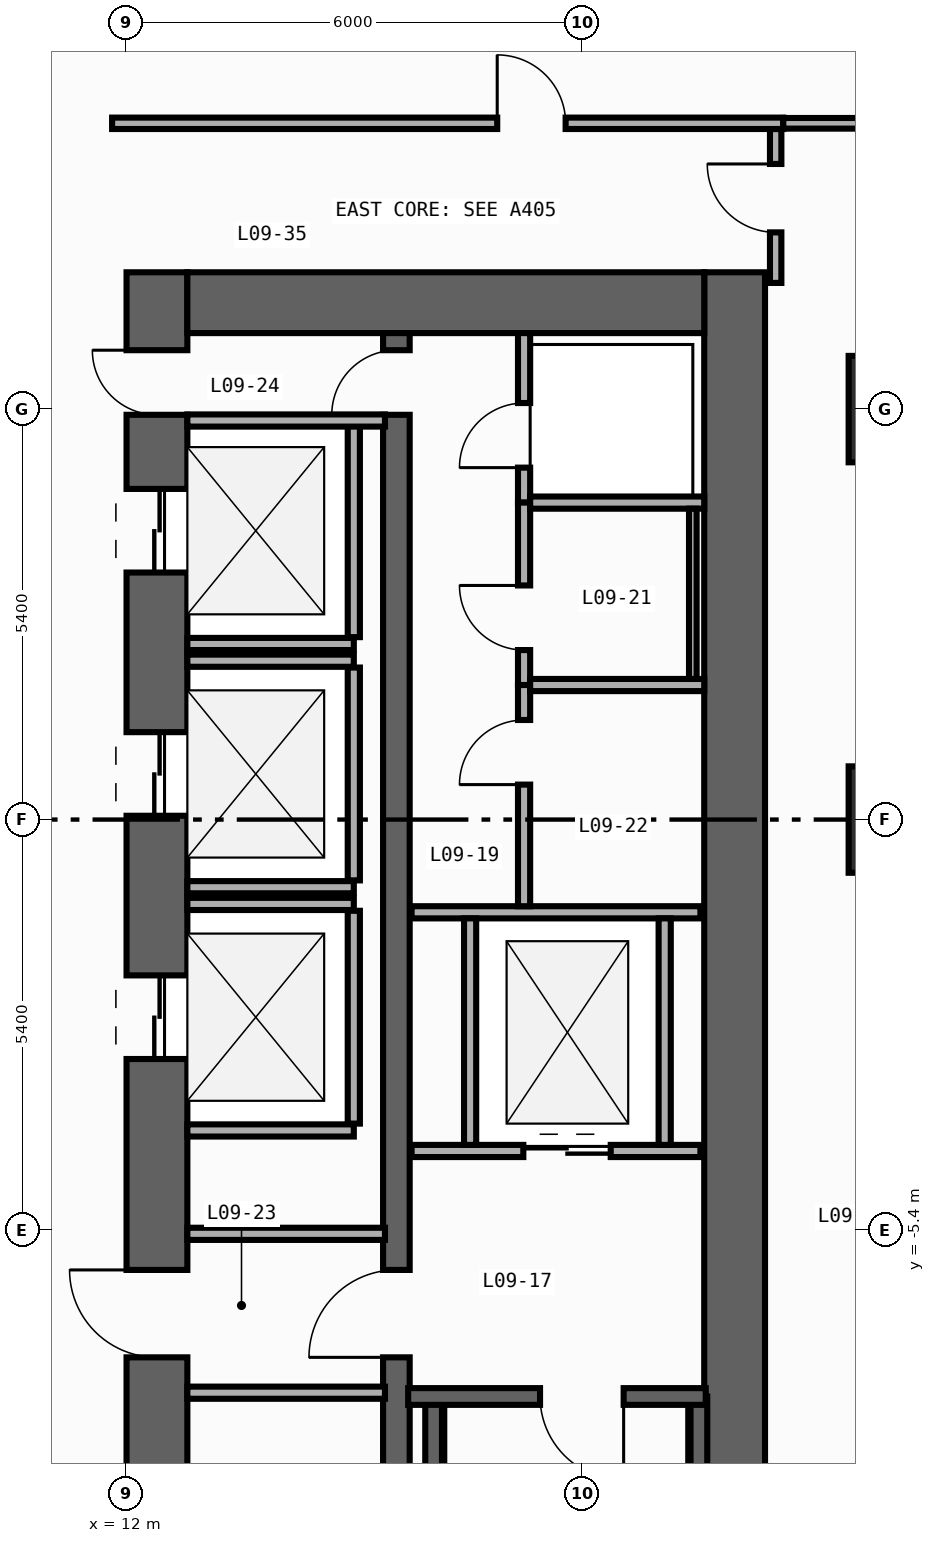
"""IFC4 building model, lengths in metres.
Left out: names, types, materials, properties, quantities, classifications, styles, units other than length and angle.
Written with IfcOpenShell. Run it as: python <this file> out.ifc"""

import sys

from ifc_helpers import new_model, si_unit, direction, frame, frame_2d, origin, origin_2d, place, context, subcontext, project, spatial, rectangle, extrude, element, fill, save


model = new_model("IFC4")
c1 = context("Model", 3, precision=1e-05, world=origin(), true_north=direction((0.0, 1.0)))
c2 = subcontext(c1, "Body", "Model", "MODEL_VIEW")
j1 = project(units=[si_unit("LENGTHUNIT", "METRE"), si_unit("PLANEANGLEUNIT", "RADIAN")], contexts=[c1])
p1 = place(None, origin())
s1 = spatial("IfcSite", under=j1, at=p1, CompositionType="ELEMENT")
p2 = place(p1, origin())
s2 = spatial("IfcBuilding", under=s1, at=p2, CompositionType="ELEMENT")
p3 = place(p2, frame((0.0, 0.0, 38.6)))
s3 = spatial("IfcBuildingStorey", under=s2, at=p3, CompositionType="ELEMENT", Elevation=38.6)
p4 = place(p3, frame((12.4, -19.8, 0.0), z_axis=(0.0, 0.0, 1.0), x_axis=(0.0, 1.0, 0.0)))
e1 = element("IfcWall", 1, at=p4, inside=s3, PredefinedType="SHEAR", context=c2, shape_type="SweptSolid", body=[
    extrude(rectangle(XDim=27.0, YDim=0.8, at=frame_2d((13.5, 0.0))), origin(), (0.0, 0.0, 1.0), 3.94),
])
p5 = place(p4, frame((23.05, 0.0, 0.0)))
e2 = element("IfcOpeningElement", 2, at=p5, cuts=e1, PredefinedType="OPENING", context=c2, shape_type="SweptSolid", body=[
    extrude(rectangle(XDim=1.1, YDim=2.2, at=frame_2d((0.55, 1.1))), frame((0.0, 0.41, 0.0), z_axis=(0.0, -1.0, 0.0), x_axis=(1.0, 0.0, 0.0)), (0.0, 0.0, 1.0), 0.82),
])
p6 = place(p4, frame((19.85, 0.0, 0.0)))
e3 = element("IfcOpeningElement", 3, at=p6, cuts=e1, PredefinedType="OPENING", context=c2, shape_type="SweptSolid", body=[
    extrude(rectangle(XDim=1.1, YDim=2.2, at=frame_2d((0.55, 1.1))), frame((0.0, 0.41, 0.0), z_axis=(0.0, -1.0, 0.0), x_axis=(1.0, 0.0, 0.0)), (0.0, 0.0, 1.0), 0.82),
])
p7 = place(p4, frame((16.65, 0.0, 0.0)))
e4 = element("IfcOpeningElement", 4, at=p7, cuts=e1, PredefinedType="OPENING", context=c2, shape_type="SweptSolid", body=[
    extrude(rectangle(XDim=1.1, YDim=2.2, at=frame_2d((0.55, 1.1))), frame((0.0, 0.41, 0.0), z_axis=(0.0, -1.0, 0.0), x_axis=(1.0, 0.0, 0.0)), (0.0, 0.0, 1.0), 0.82),
])
p8 = place(p4, frame((10.175, 0.0, 0.0)))
e5 = element("IfcOpeningElement", 5, at=p8, cuts=e1, PredefinedType="OPENING", context=c2, shape_type="SweptSolid", body=[
    extrude(rectangle(XDim=0.85, YDim=2.1, at=frame_2d((0.425, 1.05))), frame((0.0, 0.41, 0.0), z_axis=(0.0, -1.0, 0.0), x_axis=(1.0, 0.0, 0.0)), (0.0, 0.0, 1.0), 0.82),
])
p9 = place(p4, frame((12.725, 0.0, 0.0)))
e6 = element("IfcOpeningElement", 6, at=p9, cuts=e1, PredefinedType="OPENING", context=c2, shape_type="SweptSolid", body=[
    extrude(rectangle(XDim=1.15, YDim=2.2, at=frame_2d((0.575, 1.1))), frame((0.0, 0.41, 0.0), z_axis=(0.0, -1.0, 0.0), x_axis=(1.0, 0.0, 0.0)), (0.0, 0.0, 1.0), 0.82),
])
p10 = place(p4, frame((25.125, 0.0, 0.0)))
e7 = element("IfcOpeningElement", 7, at=p10, cuts=e1, PredefinedType="OPENING", context=c2, shape_type="SweptSolid", body=[
    extrude(rectangle(XDim=0.85, YDim=2.1, at=frame_2d((0.425, 1.05))), frame((0.0, 0.41, 0.0), z_axis=(0.0, -1.0, 0.0), x_axis=(1.0, 0.0, 0.0)), (0.0, 0.0, 1.0), 0.82),
])
p11 = place(p3, frame((20.0, -19.8, 0.0), z_axis=(0.0, 0.0, 1.0), x_axis=(0.0, 1.0, 0.0)))
e8 = element("IfcWall", 8, at=p11, inside=s3, PredefinedType="SHEAR", context=c2, shape_type="SweptSolid", body=[
    extrude(rectangle(XDim=27.0, YDim=0.8, at=frame_2d((13.5, 0.0))), origin(), (0.0, 0.0, 1.0), 3.94),
])
p12 = place(p3, frame((12.8, 6.8, 0.0), z_axis=(0.0, 0.0, 1.0), x_axis=(1.0, 0.0, 0.0)))
e9 = element("IfcWall", 9, at=p12, inside=s3, PredefinedType="SHEAR", context=c2, shape_type="SweptSolid", body=[
    extrude(rectangle(XDim=6.8, YDim=0.8, at=frame_2d((3.4, 0.0))), origin(), (0.0, 0.0, 1.0), 3.94),
])
p13 = place(p3, frame((15.55, -19.0, 0.0), z_axis=(0.0, 0.0, 1.0), x_axis=(0.0, 1.0, 0.0)))
e10 = element("IfcWall", 10, at=p13, inside=s3, PredefinedType="SHEAR", context=c2, shape_type="SweptSolid", body=[
    extrude(rectangle(XDim=25.4, YDim=0.35, at=frame_2d((12.7, 0.0))), origin(), (0.0, 0.0, 1.0), 3.94),
])
p14 = place(p13, frame((11.925, 0.0, 0.0)))
e11 = element("IfcOpeningElement", 11, at=p14, cuts=e10, PredefinedType="OPENING", context=c2, shape_type="SweptSolid", body=[
    extrude(rectangle(XDim=1.15, YDim=2.2, at=frame_2d((0.575, 1.1))), frame((0.0, 0.185, 0.0), z_axis=(0.0, -1.0, 0.0), x_axis=(1.0, 0.0, 0.0)), (0.0, 0.0, 1.0), 0.37),
])
p15 = place(p13, frame((24.325, 0.0, 0.0)))
e12 = element("IfcOpeningElement", 12, at=p15, cuts=e10, PredefinedType="OPENING", context=c2, shape_type="SweptSolid", body=[
    extrude(rectangle(XDim=0.85, YDim=2.1, at=frame_2d((0.425, 1.05))), frame((0.0, 0.185, 0.0), z_axis=(0.0, -1.0, 0.0), x_axis=(1.0, 0.0, 0.0)), (0.0, 0.0, 1.0), 0.37),
])
for number, where, z_axis, x_axis in (
    (13, (16.04, -18.89, 0.0), (0.0, 0.0, 1.0), (0.0, 1.0, 0.0)),
    (14, (19.53, -18.89, 0.0), (0.0, 0.0, 1.0), (0.0, 1.0, 0.0)),
):
    element("IfcWall", number, at=place(p3, frame(where, z_axis=z_axis, x_axis=x_axis)), inside=s3, PredefinedType="SHEAR", context=c2, shape_type="SweptSolid", body=[
        extrude(rectangle(XDim=11.3, YDim=0.22, at=frame_2d((5.65, 0.0))), origin(), (0.0, 0.0, 1.0), 3.94),
    ])
p16 = place(p3, frame((19.62, -7.59, 0.0), z_axis=(0.0, 0.0, 1.0), x_axis=(-1.0, 0.0, 0.0)))
e15 = element("IfcWall", 15, at=p16, inside=s3, PredefinedType="SHEAR", context=c2, shape_type="SweptSolid", body=[
    extrude(rectangle(XDim=3.915, YDim=0.22, at=frame_2d((1.958, 0.0))), origin(), (0.0, 0.0, 1.0), 3.94),
])
p17 = place(p16, frame((1.08, 0.0, 0.0)))
e16 = element("IfcOpeningElement", 16, at=p17, cuts=e15, PredefinedType="OPENING", context=c2, shape_type="SweptSolid", body=[
    extrude(rectangle(XDim=1.1, YDim=2.2, at=frame_2d((0.55, 1.1))), frame((0.0, 0.12, 0.0), z_axis=(0.0, -1.0, 0.0), x_axis=(1.0, 0.0, 0.0)), (0.0, 0.0, 1.0), 0.24),
])
for number, where, z_axis, x_axis in (
    (17, (22.2, 0.0, 0.0), (0.0, 0.0, 1.0), (1.0, 0.0, 0.0)),
    (18, (22.2, 5.4, 0.0), (0.0, 0.0, 1.0), (1.0, 0.0, 0.0)),
):
    element("IfcColumn", number, at=place(p3, frame(where, z_axis=z_axis, x_axis=x_axis)), inside=s3, PredefinedType="COLUMN", context=c2, shape_type="SweptSolid", body=[
        extrude(rectangle(XDim=1.4, YDim=1.4, at=origin_2d()), origin(), (0.0, 0.0, 1.0), 4.2),
    ])
p18 = place(p3, frame((12.8, 2.31, 0.0), z_axis=(0.0, 0.0, 1.0), x_axis=(1.0, 0.0, 0.0)))
e19 = element("IfcWall", 19, at=p18, inside=s3, PredefinedType="STANDARD", context=c2, shape_type="SweptSolid", body=[
    extrude(rectangle(XDim=2.19, YDim=0.16, at=frame_2d((1.095, 0.0))), origin(), (0.0, 0.0, 1.0), 3.94),
])
p19 = place(p3, frame((14.99, 2.4, 0.0), z_axis=(0.0, 0.0, 1.0), x_axis=(0.0, 1.0, 0.0)))
e20 = element("IfcWall", 20, at=p19, inside=s3, PredefinedType="STANDARD", context=c2, shape_type="SweptSolid", body=[
    extrude(rectangle(XDim=2.8, YDim=0.16, at=frame_2d((1.4, 0.0))), origin(), (0.0, 0.0, 1.0), 3.94),
])
for number, where, z_axis, x_axis in (
    (21, (12.8, -0.89, 0.0), (0.0, 0.0, 1.0), (1.0, 0.0, 0.0)),
    (22, (12.8, 2.09, 0.0), (0.0, 0.0, 1.0), (1.0, 0.0, 0.0)),
):
    element("IfcWall", number, at=place(p3, frame(where, z_axis=z_axis, x_axis=x_axis)), inside=s3, PredefinedType="STANDARD", context=c2, shape_type="SweptSolid", body=[
        extrude(rectangle(XDim=2.19, YDim=0.16, at=frame_2d((1.095, 0.0))), origin(), (0.0, 0.0, 1.0), 3.94),
    ])
p20 = place(p3, frame((14.99, -0.8, 0.0), z_axis=(0.0, 0.0, 1.0), x_axis=(0.0, 1.0, 0.0)))
e23 = element("IfcWall", 23, at=p20, inside=s3, PredefinedType="STANDARD", context=c2, shape_type="SweptSolid", body=[
    extrude(rectangle(XDim=2.8, YDim=0.16, at=frame_2d((1.4, 0.0))), origin(), (0.0, 0.0, 1.0), 3.94),
])
for number, where, z_axis, x_axis in (
    (24, (12.8, -4.09, 0.0), (0.0, 0.0, 1.0), (1.0, 0.0, 0.0)),
    (25, (12.8, -1.11, 0.0), (0.0, 0.0, 1.0), (1.0, 0.0, 0.0)),
):
    element("IfcWall", number, at=place(p3, frame(where, z_axis=z_axis, x_axis=x_axis)), inside=s3, PredefinedType="STANDARD", context=c2, shape_type="SweptSolid", body=[
        extrude(rectangle(XDim=2.19, YDim=0.16, at=frame_2d((1.095, 0.0))), origin(), (0.0, 0.0, 1.0), 3.94),
    ])
p21 = place(p3, frame((14.99, -4.0, 0.0), z_axis=(0.0, 0.0, 1.0), x_axis=(0.0, 1.0, 0.0)))
e26 = element("IfcWall", 26, at=p21, inside=s3, PredefinedType="STANDARD", context=c2, shape_type="SweptSolid", body=[
    extrude(rectangle(XDim=2.8, YDim=0.16, at=frame_2d((1.4, 0.0))), origin(), (0.0, 0.0, 1.0), 3.94),
])
p22 = place(p3, frame((15.75, -4.36, 0.0), z_axis=(0.0, 0.0, 1.0), x_axis=(1.0, 0.0, 0.0)))
e27 = element("IfcWall", 27, at=p22, inside=s3, PredefinedType="STANDARD", context=c2, shape_type="SweptSolid", body=[
    extrude(rectangle(XDim=3.8, YDim=0.16, at=frame_2d((1.9, 0.0))), origin(), (0.0, 0.0, 1.0), 3.94),
])
p23 = place(p22, frame((1.47, 0.0, 0.0)))
e28 = element("IfcOpeningElement", 28, at=p23, cuts=e27, PredefinedType="OPENING", context=c2, shape_type="SweptSolid", body=[
    extrude(rectangle(XDim=1.15, YDim=2.2, at=frame_2d((0.575, 1.1))), frame((0.0, 0.09, 0.0), z_axis=(0.0, -1.0, 0.0), x_axis=(1.0, 0.0, 0.0)), (0.0, 0.0, 1.0), 0.18),
])
p24 = place(p3, frame((15.75, -1.22, 0.0), z_axis=(0.0, 0.0, 1.0), x_axis=(1.0, 0.0, 0.0)))
e29 = element("IfcWall", 29, at=p24, inside=s3, PredefinedType="STANDARD", context=c2, shape_type="SweptSolid", body=[
    extrude(rectangle(XDim=3.8, YDim=0.16, at=frame_2d((1.9, 0.0))), origin(), (0.0, 0.0, 1.0), 3.94),
])
for number, where, z_axis, x_axis in (
    (30, (16.52, -4.28, 0.0), (0.0, 0.0, 1.0), (0.0, 1.0, 0.0)),
    (31, (19.08, -4.28, 0.0), (0.0, 0.0, 1.0), (0.0, 1.0, 0.0)),
):
    element("IfcWall", number, at=place(p3, frame(where, z_axis=z_axis, x_axis=x_axis)), inside=s3, PredefinedType="STANDARD", context=c2, shape_type="SweptSolid", body=[
        extrude(rectangle(XDim=2.98, YDim=0.16, at=frame_2d((1.49, 0.0))), origin(), (0.0, 0.0, 1.0), 3.94),
    ])
for number, where, z_axis, x_axis in (
    (32, (12.8, -5.45, 0.0), (0.0, 0.0, 1.0), (1.0, 0.0, 0.0)),
    (33, (12.8, -7.54, 0.0), (0.0, 0.0, 1.0), (1.0, 0.0, 0.0)),
    (34, (12.8, 5.25, 0.0), (0.0, 0.0, 1.0), (1.0, 0.0, 0.0)),
):
    element("IfcWall", number, at=place(p3, frame(where, z_axis=z_axis, x_axis=x_axis)), inside=s3, PredefinedType="STANDARD", context=c2, shape_type="SweptSolid", body=[
        extrude(rectangle(XDim=2.6, YDim=0.16, at=frame_2d((1.3, 0.0))), origin(), (0.0, 0.0, 1.0), 3.94),
    ])
p25 = place(p3, frame((17.23, 4.17, 0.0), z_axis=(0.0, 0.0, 1.0), x_axis=(0.0, 1.0, 0.0)))
e35 = element("IfcWall", 35, at=p25, inside=s3, PredefinedType="PARTITIONING", context=c2, shape_type="SweptSolid", body=[
    extrude(rectangle(XDim=2.23, YDim=0.16, at=frame_2d((1.115, 0.0))), origin(), (0.0, 0.0, 1.0), 3.94),
])
p26 = place(p25, frame((0.46, 0.0, 0.0)))
e36 = element("IfcOpeningElement", 36, at=p26, cuts=e35, PredefinedType="OPENING", context=c2, shape_type="SweptSolid", body=[
    extrude(rectangle(XDim=0.85, YDim=2.1, at=frame_2d((0.425, 1.05))), frame((0.0, 0.09, 0.0), z_axis=(0.0, -1.0, 0.0), x_axis=(1.0, 0.0, 0.0)), (0.0, 0.0, 1.0), 0.18),
])
p27 = place(p3, frame((17.23, 1.77, 0.0), z_axis=(0.0, 0.0, 1.0), x_axis=(0.0, 1.0, 0.0)))
e37 = element("IfcWall", 37, at=p27, inside=s3, PredefinedType="PARTITIONING", context=c2, shape_type="SweptSolid", body=[
    extrude(rectangle(XDim=2.4, YDim=0.16, at=frame_2d((1.2, 0.0))), origin(), (0.0, 0.0, 1.0), 3.94),
])
p28 = place(p27, frame((0.46, 0.0, 0.0)))
e38 = element("IfcOpeningElement", 38, at=p28, cuts=e37, PredefinedType="OPENING", context=c2, shape_type="SweptSolid", body=[
    extrude(rectangle(XDim=0.85, YDim=2.1, at=frame_2d((0.425, 1.05))), frame((0.0, 0.09, 0.0), z_axis=(0.0, -1.0, 0.0), x_axis=(1.0, 0.0, 0.0)), (0.0, 0.0, 1.0), 0.18),
])
p29 = place(p3, frame((17.23, -1.14, 0.0), z_axis=(0.0, 0.0, 1.0), x_axis=(0.0, 1.0, 0.0)))
e39 = element("IfcWall", 39, at=p29, inside=s3, PredefinedType="PARTITIONING", context=c2, shape_type="SweptSolid", body=[
    extrude(rectangle(XDim=2.91, YDim=0.16, at=frame_2d((1.455, 0.0))), origin(), (0.0, 0.0, 1.0), 3.94),
])
p30 = place(p29, frame((1.6, 0.0, 0.0)))
e40 = element("IfcOpeningElement", 40, at=p30, cuts=e39, PredefinedType="OPENING", context=c2, shape_type="SweptSolid", body=[
    extrude(rectangle(XDim=0.85, YDim=2.1, at=frame_2d((0.425, 1.05))), frame((0.0, 0.09, 0.0), z_axis=(0.0, -1.0, 0.0), x_axis=(1.0, 0.0, 0.0)), (0.0, 0.0, 1.0), 0.18),
])
for number, where, z_axis, x_axis in (
    (41, (17.31, 4.17, 0.0), (0.0, 0.0, 1.0), (1.0, 0.0, 0.0)),
    (42, (17.31, 1.77, 0.0), (0.0, 0.0, 1.0), (1.0, 0.0, 0.0)),
):
    element("IfcWall", number, at=place(p3, frame(where, z_axis=z_axis, x_axis=x_axis)), inside=s3, PredefinedType="PARTITIONING", context=c2, shape_type="SweptSolid", body=[
        extrude(rectangle(XDim=2.29, YDim=0.16, at=frame_2d((1.145, 0.0))), origin(), (0.0, 0.0, 1.0), 3.94),
    ])
p31 = place(p3, frame((20.54, 7.06, 0.0), z_axis=(0.0, 0.0, 1.0), x_axis=(0.0, 1.0, 0.0)))
e43 = element("IfcWall", 43, at=p31, inside=s3, PredefinedType="PARTITIONING", context=c2, shape_type="SweptSolid", body=[
    extrude(rectangle(XDim=2.025, YDim=0.15, at=frame_2d((1.012, 0.0))), origin(), (0.0, 0.0, 1.0), 3.94),
])
p32 = place(p31, frame((0.665, 0.0, 0.0)))
e44 = element("IfcOpeningElement", 44, at=p32, cuts=e43, PredefinedType="OPENING", context=c2, shape_type="SweptSolid", body=[
    extrude(rectangle(XDim=0.9, YDim=2.15, at=frame_2d((0.45, 1.075))), frame((0.0, 0.085, 0.0), z_axis=(0.0, -1.0, 0.0), x_axis=(1.0, 0.0, 0.0)), (0.0, 0.0, 1.0), 0.17),
])
p33 = place(p3, frame((11.81, 9.16, 0.0), z_axis=(0.0, 0.0, 1.0), x_axis=(1.0, 0.0, 0.0)))
e45 = element("IfcWall", 45, at=p33, inside=s3, PredefinedType="PARTITIONING", context=c2, shape_type="SweptSolid", body=[
    extrude(rectangle(XDim=8.83, YDim=0.15, at=frame_2d((4.415, 0.0))), origin(), (0.0, 0.0, 1.0), 3.94),
])
p34 = place(p33, frame((5.067, 0.0, 0.0)))
e46 = element("IfcOpeningElement", 46, at=p34, cuts=e45, PredefinedType="OPENING", context=c2, shape_type="SweptSolid", body=[
    extrude(rectangle(XDim=0.9, YDim=2.15, at=frame_2d((0.45, 1.075))), frame((0.0, 0.085, 0.0), z_axis=(0.0, -1.0, 0.0), x_axis=(1.0, 0.0, 0.0)), (0.0, 0.0, 1.0), 0.17),
])
p35 = place(p3, frame((20.64, 9.16, 0.0), z_axis=(0.0, 0.0, 1.0), x_axis=(1.0, 0.0, 0.0)))
e47 = element("IfcWall", 47, at=p35, inside=s3, PredefinedType="PARTITIONING", context=c2, shape_type="SweptSolid", body=[
    extrude(rectangle(XDim=3.415, YDim=0.14, at=frame_2d((1.708, 0.0))), origin(), (0.0, 0.0, 1.0), 3.94),
])
p36 = place(p3, frame((19.45, 4.09, 0.0), z_axis=(0.0, 0.0, 1.0), x_axis=(0.0, -1.0, 0.0)))
e48 = element("IfcWall", 48, at=p36, inside=s3, PredefinedType="PARTITIONING", context=c2, shape_type="SweptSolid", body=[
    extrude(rectangle(XDim=2.24, YDim=0.1, at=frame_2d((1.12, 0.0))), origin(), (0.0, 0.0, 1.0), 3.94),
])
p37 = place(p17, origin())
e49 = element("IfcDoor", 49, at=p37, inside=s3, OperationType="SINGLE_SWING_LEFT", PredefinedType="DOOR", context=c2, shape_type="SweptSolid", body=[
    extrude(rectangle(XDim=1.1, YDim=2.2, at=frame_2d((0.55, 1.1))), frame((0.0, 0.025, 0.0), z_axis=(0.0, -1.0, 0.0), x_axis=(1.0, 0.0, 0.0)), (0.0, 0.0, 1.0), 0.05),
])
fill(e16, e49)
p38 = place(p5, origin())
e50 = element("IfcDoor", 50, at=p38, inside=s3, OperationType="DOUBLE_DOOR_SLIDING", PredefinedType="DOOR", context=c2, shape_type="SweptSolid", body=[
    extrude(rectangle(XDim=1.1, YDim=2.2, at=frame_2d((0.55, 1.1))), frame((0.0, 0.025, 0.0), z_axis=(0.0, -1.0, 0.0), x_axis=(1.0, 0.0, 0.0)), (0.0, 0.0, 1.0), 0.05),
])
fill(e2, e50)
p39 = place(p6, origin())
e51 = element("IfcDoor", 51, at=p39, inside=s3, OperationType="DOUBLE_DOOR_SLIDING", PredefinedType="DOOR", context=c2, shape_type="SweptSolid", body=[
    extrude(rectangle(XDim=1.1, YDim=2.2, at=frame_2d((0.55, 1.1))), frame((0.0, 0.025, 0.0), z_axis=(0.0, -1.0, 0.0), x_axis=(1.0, 0.0, 0.0)), (0.0, 0.0, 1.0), 0.05),
])
fill(e3, e51)
p40 = place(p7, origin())
e52 = element("IfcDoor", 52, at=p40, inside=s3, OperationType="DOUBLE_DOOR_SLIDING", PredefinedType="DOOR", context=c2, shape_type="SweptSolid", body=[
    extrude(rectangle(XDim=1.1, YDim=2.2, at=frame_2d((0.55, 1.1))), frame((0.0, 0.025, 0.0), z_axis=(0.0, -1.0, 0.0), x_axis=(1.0, 0.0, 0.0)), (0.0, 0.0, 1.0), 0.05),
])
fill(e4, e52)
p41 = place(p9, origin())
e53 = element("IfcDoor", 53, at=p41, inside=s3, OperationType="SINGLE_SWING_RIGHT", PredefinedType="DOOR", context=c2, shape_type="SweptSolid", body=[
    extrude(rectangle(XDim=1.15, YDim=2.2, at=frame_2d((0.575, 1.1))), frame((0.0, 0.025, 0.0), z_axis=(0.0, -1.0, 0.0), x_axis=(1.0, 0.0, 0.0)), (0.0, 0.0, 1.0), 0.05),
])
fill(e6, e53)
p42 = place(p14, origin())
e54 = element("IfcDoor", 54, at=p42, inside=s3, OperationType="SINGLE_SWING_LEFT", PredefinedType="DOOR", context=c2, shape_type="SweptSolid", body=[
    extrude(rectangle(XDim=1.15, YDim=2.2, at=frame_2d((0.575, 1.1))), frame((0.0, 0.025, 0.0), z_axis=(0.0, -1.0, 0.0), x_axis=(1.0, 0.0, 0.0)), (0.0, 0.0, 1.0), 0.05),
])
fill(e11, e54)
p43 = place(p10, origin())
e55 = element("IfcDoor", 55, at=p43, inside=s3, OperationType="SINGLE_SWING_RIGHT", PredefinedType="DOOR", context=c2, shape_type="SweptSolid", body=[
    extrude(rectangle(XDim=0.85, YDim=2.1, at=frame_2d((0.425, 1.05))), frame((0.0, 0.025, 0.0), z_axis=(0.0, -1.0, 0.0), x_axis=(1.0, 0.0, 0.0)), (0.0, 0.0, 1.0), 0.05),
])
fill(e7, e55)
p44 = place(p15, origin())
e56 = element("IfcDoor", 56, at=p44, inside=s3, OperationType="SINGLE_SWING_LEFT", PredefinedType="DOOR", context=c2, shape_type="SweptSolid", body=[
    extrude(rectangle(XDim=0.85, YDim=2.1, at=frame_2d((0.425, 1.05))), frame((0.0, 0.025, 0.0), z_axis=(0.0, -1.0, 0.0), x_axis=(1.0, 0.0, 0.0)), (0.0, 0.0, 1.0), 0.05),
])
fill(e12, e56)
p45 = place(p23, origin())
e57 = element("IfcDoor", 57, at=p45, inside=s3, OperationType="DOUBLE_DOOR_SLIDING", PredefinedType="DOOR", context=c2, shape_type="SweptSolid", body=[
    extrude(rectangle(XDim=1.15, YDim=2.2, at=frame_2d((0.575, 1.1))), frame((0.0, 0.025, 0.0), z_axis=(0.0, -1.0, 0.0), x_axis=(1.0, 0.0, 0.0)), (0.0, 0.0, 1.0), 0.05),
])
fill(e28, e57)
p46 = place(p26, origin())
e58 = element("IfcDoor", 58, at=p46, inside=s3, OperationType="SINGLE_SWING_LEFT", PredefinedType="DOOR", context=c2, shape_type="SweptSolid", body=[
    extrude(rectangle(XDim=0.85, YDim=2.1, at=frame_2d((0.425, 1.05))), frame((0.0, 0.025, 0.0), z_axis=(0.0, -1.0, 0.0), x_axis=(1.0, 0.0, 0.0)), (0.0, 0.0, 1.0), 0.05),
])
fill(e36, e58)
p47 = place(p28, origin())
e59 = element("IfcDoor", 59, at=p47, inside=s3, OperationType="SINGLE_SWING_RIGHT", PredefinedType="DOOR", context=c2, shape_type="SweptSolid", body=[
    extrude(rectangle(XDim=0.85, YDim=2.1, at=frame_2d((0.425, 1.05))), frame((0.0, 0.025, 0.0), z_axis=(0.0, -1.0, 0.0), x_axis=(1.0, 0.0, 0.0)), (0.0, 0.0, 1.0), 0.05),
])
fill(e38, e59)
p48 = place(p30, origin())
e60 = element("IfcDoor", 60, at=p48, inside=s3, OperationType="SINGLE_SWING_LEFT", PredefinedType="DOOR", context=c2, shape_type="SweptSolid", body=[
    extrude(rectangle(XDim=0.85, YDim=2.1, at=frame_2d((0.425, 1.05))), frame((0.0, 0.025, 0.0), z_axis=(0.0, -1.0, 0.0), x_axis=(1.0, 0.0, 0.0)), (0.0, 0.0, 1.0), 0.05),
])
fill(e40, e60)
p49 = place(p32, origin())
e61 = element("IfcDoor", 61, at=p49, inside=s3, OperationType="SINGLE_SWING_RIGHT", PredefinedType="DOOR", context=c2, shape_type="SweptSolid", body=[
    extrude(rectangle(XDim=0.9, YDim=2.15, at=frame_2d((0.45, 1.075))), frame((0.0, 0.025, 0.0), z_axis=(0.0, -1.0, 0.0), x_axis=(1.0, 0.0, 0.0)), (0.0, 0.0, 1.0), 0.05),
])
fill(e44, e61)
p50 = place(p34, origin())
e62 = element("IfcDoor", 62, at=p50, inside=s3, OperationType="SINGLE_SWING_LEFT", PredefinedType="DOOR", context=c2, shape_type="SweptSolid", body=[
    extrude(rectangle(XDim=0.9, YDim=2.15, at=frame_2d((0.45, 1.075))), frame((0.0, 0.025, 0.0), z_axis=(0.0, -1.0, 0.0), x_axis=(1.0, 0.0, 0.0)), (0.0, 0.0, 1.0), 0.05),
])
fill(e46, e62)
save(model, sys.argv[1])
